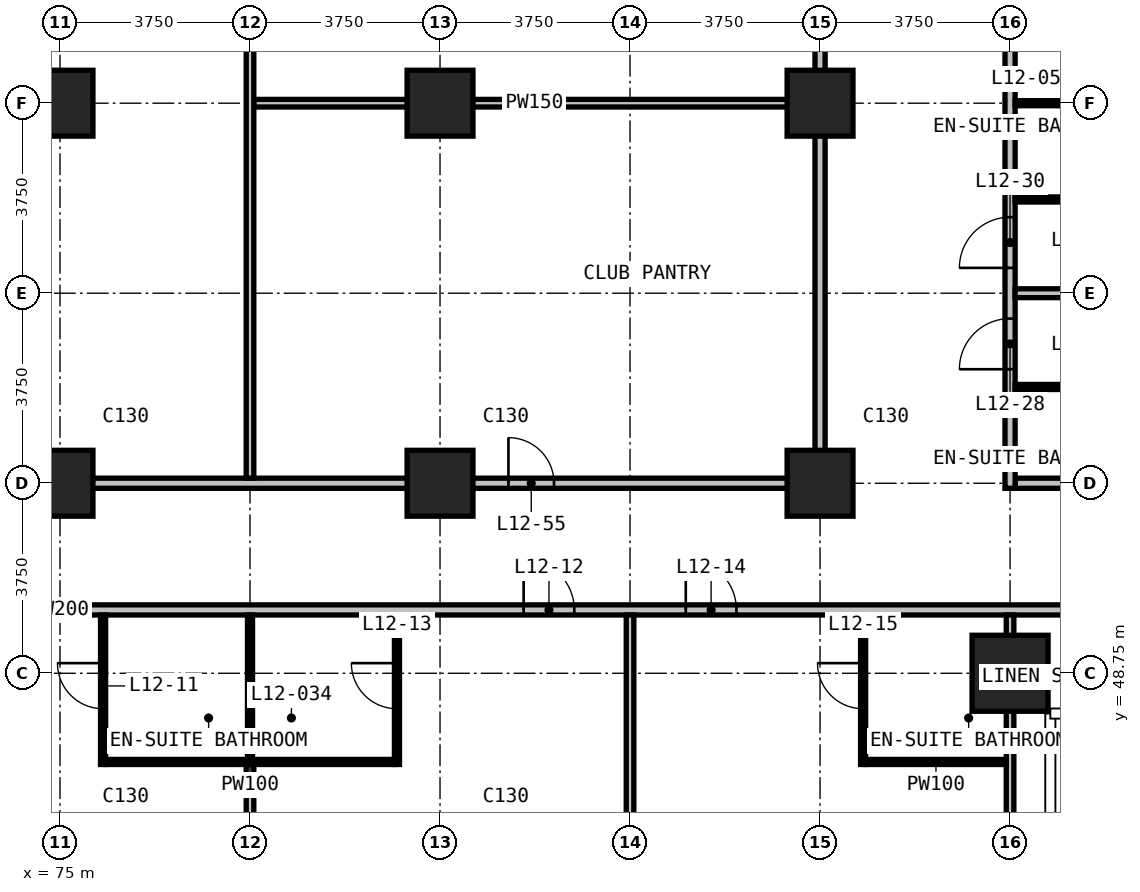
"""IFC4 building model, lengths in metres.
Left out: names, types, materials, properties, quantities, classifications, styles, units other than length and angle.
Written with IfcOpenShell. Run it as: python <this file> out.ifc"""

import sys

from ifc_helpers import new_model, si_unit, direction, frame, frame_2d, origin, origin_2d, place, context, subcontext, project, spatial, rectangle, extrude, element, fill, save


model = new_model("IFC4")
c1 = context("Model", 3, precision=1e-05, world=origin(), true_north=direction((0.0, 1.0)))
c2 = subcontext(c1, "Body", "Model", "MODEL_VIEW")
j1 = project(units=[si_unit("LENGTHUNIT", "METRE"), si_unit("PLANEANGLEUNIT", "RADIAN")], contexts=[c1])
p1 = place(None, origin())
s1 = spatial("IfcSite", under=j1, at=p1, CompositionType="ELEMENT")
p2 = place(p1, origin())
s2 = spatial("IfcBuilding", under=s1, at=p2, CompositionType="ELEMENT")
p3 = place(p2, frame((0.0, 0.0, 59.3)))
s3 = spatial("IfcBuildingStorey", under=s2, at=p3, CompositionType="ELEMENT", Elevation=59.3)
for number, where, z_axis, x_axis in (
    (1, (75.0, 52.5, 0.0), (0.0, 0.0, 1.0), (1.0, 0.0, 0.0)),
    (2, (75.0, 60.0, 0.0), (0.0, 0.0, 1.0), (1.0, 0.0, 0.0)),
    (3, (82.5, 52.5, 0.0), (0.0, 0.0, 1.0), (1.0, 0.0, 0.0)),
    (4, (82.5, 60.0, 0.0), (0.0, 0.0, 1.0), (1.0, 0.0, 0.0)),
    (5, (90.0, 52.5, 0.0), (0.0, 0.0, 1.0), (1.0, 0.0, 0.0)),
    (6, (90.0, 60.0, 0.0), (0.0, 0.0, 1.0), (1.0, 0.0, 0.0)),
):
    element("IfcColumn", number, at=place(p3, frame(where, z_axis=z_axis, x_axis=x_axis)), inside=s3, PredefinedType="COLUMN", context=c2, shape_type="SweptSolid", body=[
        extrude(rectangle(XDim=1.3, YDim=1.3, at=origin_2d()), origin(), (0.0, 0.0, 1.0), 3.3),
    ])
p4 = place(p3, frame((93.75, 48.75, 0.0), z_axis=(0.0, 0.0, 1.0), x_axis=(1.0, 0.0, 0.0)))
e7 = element("IfcColumn", 7, at=p4, inside=s3, PredefinedType="COLUMN", context=c2, shape_type="SweptSolid", body=[
    extrude(rectangle(XDim=1.5, YDim=1.5, at=origin_2d()), origin(), (0.0, 0.0, 1.0), 3.3),
])
p5 = place(p3, frame((51.735, 50.0, 0.0), z_axis=(0.0, 0.0, 1.0), x_axis=(1.0, 0.0, 0.0)))
e8 = element("IfcWall", 8, at=p5, inside=s3, PredefinedType="PARTITIONING", context=c2, shape_type="SweptSolid", body=[
    extrude(rectangle(XDim=46.53, YDim=0.2, at=frame_2d((23.265, 0.0))), origin(), (0.0, 0.0, 1.0), 3.0),
])
p6 = place(p5, frame((5.615, 0.0, 0.0)))
e9 = element("IfcOpeningElement", 9, at=p6, cuts=e8, PredefinedType="OPENING", context=c2, shape_type="SweptSolid", body=[
    extrude(rectangle(XDim=1.0, YDim=2.2, at=frame_2d((0.5, 1.1))), frame((0.0, 0.11, 0.0), z_axis=(0.0, -1.0, 0.0), x_axis=(1.0, 0.0, 0.0)), (0.0, 0.0, 1.0), 0.22),
])
p7 = place(p5, frame((17.415, 0.0, 0.0)))
e10 = element("IfcOpeningElement", 10, at=p7, cuts=e8, PredefinedType="OPENING", context=c2, shape_type="SweptSolid", body=[
    extrude(rectangle(XDim=1.0, YDim=2.2, at=frame_2d((0.5, 1.1))), frame((0.0, 0.11, 0.0), z_axis=(0.0, -1.0, 0.0), x_axis=(1.0, 0.0, 0.0)), (0.0, 0.0, 1.0), 0.22),
])
p8 = place(p5, frame((20.615, 0.0, 0.0)))
e11 = element("IfcOpeningElement", 11, at=p8, cuts=e8, PredefinedType="OPENING", context=c2, shape_type="SweptSolid", body=[
    extrude(rectangle(XDim=1.0, YDim=2.2, at=frame_2d((0.5, 1.1))), frame((0.0, 0.11, 0.0), z_axis=(0.0, -1.0, 0.0), x_axis=(1.0, 0.0, 0.0)), (0.0, 0.0, 1.0), 0.22),
])
p9 = place(p5, frame((32.415, 0.0, 0.0)))
e12 = element("IfcOpeningElement", 12, at=p9, cuts=e8, PredefinedType="OPENING", context=c2, shape_type="SweptSolid", body=[
    extrude(rectangle(XDim=1.0, YDim=2.2, at=frame_2d((0.5, 1.1))), frame((0.0, 0.11, 0.0), z_axis=(0.0, -1.0, 0.0), x_axis=(1.0, 0.0, 0.0)), (0.0, 0.0, 1.0), 0.22),
])
p10 = place(p5, frame((35.615, 0.0, 0.0)))
e13 = element("IfcOpeningElement", 13, at=p10, cuts=e8, PredefinedType="OPENING", context=c2, shape_type="SweptSolid", body=[
    extrude(rectangle(XDim=1.0, YDim=2.2, at=frame_2d((0.5, 1.1))), frame((0.0, 0.11, 0.0), z_axis=(0.0, -1.0, 0.0), x_axis=(1.0, 0.0, 0.0)), (0.0, 0.0, 1.0), 0.22),
])
p11 = place(p5, frame((1.8, 0.0, 0.0)))
e14 = element("IfcOpeningElement", 14, at=p11, cuts=e8, PredefinedType="OPENING", context=c2, shape_type="SweptSolid", body=[
    extrude(rectangle(XDim=0.9, YDim=2.2, at=frame_2d((0.45, 1.1))), frame((0.0, 0.11, 0.0), z_axis=(0.0, -1.0, 0.0), x_axis=(1.0, 0.0, 0.0)), (0.0, 0.0, 1.0), 0.22),
])
p12 = place(p5, frame((43.815, 0.0, 0.0)))
e15 = element("IfcOpeningElement", 15, at=p12, cuts=e8, PredefinedType="OPENING", context=c2, shape_type="SweptSolid", body=[
    extrude(rectangle(XDim=0.9, YDim=2.2, at=frame_2d((0.45, 1.1))), frame((0.0, 0.11, 0.0), z_axis=(0.0, -1.0, 0.0), x_axis=(1.0, 0.0, 0.0)), (0.0, 0.0, 1.0), 0.22),
])
p13 = place(p3, frame((60.1, 52.5, 0.0), z_axis=(0.0, 0.0, 1.0), x_axis=(1.0, 0.0, 0.0)))
e16 = element("IfcWall", 16, at=p13, inside=s3, PredefinedType="PARTITIONING", context=c2, shape_type="SweptSolid", body=[
    extrude(rectangle(XDim=29.8, YDim=0.2, at=frame_2d((14.9, 0.0))), origin(), (0.0, 0.0, 1.0), 3.0),
])
p14 = place(p13, frame((8.4, 0.0, 0.0)))
e17 = element("IfcOpeningElement", 17, at=p14, cuts=e16, PredefinedType="OPENING", context=c2, shape_type="SweptSolid", body=[
    extrude(rectangle(XDim=1.8, YDim=2.2, at=frame_2d((0.9, 1.1))), frame((0.0, 0.11, 0.0), z_axis=(0.0, -1.0, 0.0), x_axis=(1.0, 0.0, 0.0)), (0.0, 0.0, 1.0), 0.22),
])
p15 = place(p13, frame((23.75, 0.0, 0.0)))
e18 = element("IfcOpeningElement", 18, at=p15, cuts=e16, PredefinedType="OPENING", context=c2, shape_type="SweptSolid", body=[
    extrude(rectangle(XDim=0.9, YDim=2.2, at=frame_2d((0.45, 1.1))), frame((0.0, 0.11, 0.0), z_axis=(0.0, -1.0, 0.0), x_axis=(1.0, 0.0, 0.0)), (0.0, 0.0, 1.0), 0.22),
])
p16 = place(p3, frame((93.85, 52.5, 0.0), z_axis=(0.0, 0.0, 1.0), x_axis=(1.0, 0.0, 0.0)))
e19 = element("IfcWall", 19, at=p16, inside=s3, PredefinedType="PARTITIONING", context=c2, shape_type="SweptSolid", body=[
    extrude(rectangle(XDim=4.315, YDim=0.2, at=frame_2d((2.157, 0.0))), origin(), (0.0, 0.0, 1.0), 3.0),
])
p17 = place(p3, frame((90.0, 52.4, 0.0), z_axis=(0.0, 0.0, 1.0), x_axis=(0.0, 1.0, 0.0)))
e20 = element("IfcWall", 20, at=p17, inside=s3, PredefinedType="PARTITIONING", context=c2, shape_type="SweptSolid", body=[
    extrude(rectangle(XDim=18.84, YDim=0.2, at=frame_2d((9.42, 0.0))), origin(), (0.0, 0.0, 1.0), 3.0),
])
p18 = place(p17, frame((10.85, 0.0, 0.0)))
e21 = element("IfcOpeningElement", 21, at=p18, cuts=e20, PredefinedType="OPENING", context=c2, shape_type="SweptSolid", body=[
    extrude(rectangle(XDim=1.0, YDim=2.2, at=frame_2d((0.5, 1.1))), frame((0.0, 0.11, 0.0), z_axis=(0.0, -1.0, 0.0), x_axis=(1.0, 0.0, 0.0)), (0.0, 0.0, 1.0), 0.22),
])
p19 = place(p17, frame((16.5, 0.0, 0.0)))
e22 = element("IfcOpeningElement", 22, at=p19, cuts=e20, PredefinedType="OPENING", context=c2, shape_type="SweptSolid", body=[
    extrude(rectangle(XDim=0.9, YDim=2.2, at=frame_2d((0.45, 1.1))), frame((0.0, 0.11, 0.0), z_axis=(0.0, -1.0, 0.0), x_axis=(1.0, 0.0, 0.0)), (0.0, 0.0, 1.0), 0.22),
])
p20 = place(p3, frame((93.75, 52.4, 0.0), z_axis=(0.0, 0.0, 1.0), x_axis=(0.0, 1.0, 0.0)))
e23 = element("IfcWall", 23, at=p20, inside=s3, PredefinedType="PARTITIONING", context=c2, shape_type="SweptSolid", body=[
    extrude(rectangle(XDim=33.925, YDim=0.2, at=frame_2d((16.962, 0.0))), origin(), (0.0, 0.0, 1.0), 3.0),
])
p21 = place(p20, frame((2.35, 0.0, 0.0)))
e24 = element("IfcOpeningElement", 24, at=p21, cuts=e23, PredefinedType="OPENING", context=c2, shape_type="SweptSolid", body=[
    extrude(rectangle(XDim=1.0, YDim=2.2, at=frame_2d((0.5, 1.1))), frame((0.0, 0.11, 0.0), z_axis=(0.0, -1.0, 0.0), x_axis=(1.0, 0.0, 0.0)), (0.0, 0.0, 1.0), 0.22),
])
p22 = place(p20, frame((4.35, 0.0, 0.0)))
e25 = element("IfcOpeningElement", 25, at=p22, cuts=e23, PredefinedType="OPENING", context=c2, shape_type="SweptSolid", body=[
    extrude(rectangle(XDim=1.0, YDim=2.2, at=frame_2d((0.5, 1.1))), frame((0.0, 0.11, 0.0), z_axis=(0.0, -1.0, 0.0), x_axis=(1.0, 0.0, 0.0)), (0.0, 0.0, 1.0), 0.22),
])
p23 = place(p20, frame((9.85, 0.0, 0.0)))
e26 = element("IfcOpeningElement", 26, at=p23, cuts=e23, PredefinedType="OPENING", context=c2, shape_type="SweptSolid", body=[
    extrude(rectangle(XDim=1.0, YDim=2.2, at=frame_2d((0.5, 1.1))), frame((0.0, 0.11, 0.0), z_axis=(0.0, -1.0, 0.0), x_axis=(1.0, 0.0, 0.0)), (0.0, 0.0, 1.0), 0.22),
])
p24 = place(p20, frame((11.85, 0.0, 0.0)))
e27 = element("IfcOpeningElement", 27, at=p24, cuts=e23, PredefinedType="OPENING", context=c2, shape_type="SweptSolid", body=[
    extrude(rectangle(XDim=1.0, YDim=2.2, at=frame_2d((0.5, 1.1))), frame((0.0, 0.11, 0.0), z_axis=(0.0, -1.0, 0.0), x_axis=(1.0, 0.0, 0.0)), (0.0, 0.0, 1.0), 0.22),
])
p25 = place(p20, frame((17.35, 0.0, 0.0)))
e28 = element("IfcOpeningElement", 28, at=p25, cuts=e23, PredefinedType="OPENING", context=c2, shape_type="SweptSolid", body=[
    extrude(rectangle(XDim=1.0, YDim=2.2, at=frame_2d((0.5, 1.1))), frame((0.0, 0.11, 0.0), z_axis=(0.0, -1.0, 0.0), x_axis=(1.0, 0.0, 0.0)), (0.0, 0.0, 1.0), 0.22),
])
p26 = place(p20, frame((19.35, 0.0, 0.0)))
e29 = element("IfcOpeningElement", 29, at=p26, cuts=e23, PredefinedType="OPENING", context=c2, shape_type="SweptSolid", body=[
    extrude(rectangle(XDim=1.0, YDim=2.2, at=frame_2d((0.5, 1.1))), frame((0.0, 0.11, 0.0), z_axis=(0.0, -1.0, 0.0), x_axis=(1.0, 0.0, 0.0)), (0.0, 0.0, 1.0), 0.22),
])
p27 = place(p20, frame((24.85, 0.0, 0.0)))
e30 = element("IfcOpeningElement", 30, at=p27, cuts=e23, PredefinedType="OPENING", context=c2, shape_type="SweptSolid", body=[
    extrude(rectangle(XDim=1.0, YDim=2.2, at=frame_2d((0.5, 1.1))), frame((0.0, 0.11, 0.0), z_axis=(0.0, -1.0, 0.0), x_axis=(1.0, 0.0, 0.0)), (0.0, 0.0, 1.0), 0.22),
])
p28 = place(p20, frame((26.85, 0.0, 0.0)))
e31 = element("IfcOpeningElement", 31, at=p28, cuts=e23, PredefinedType="OPENING", context=c2, shape_type="SweptSolid", body=[
    extrude(rectangle(XDim=1.0, YDim=2.2, at=frame_2d((0.5, 1.1))), frame((0.0, 0.11, 0.0), z_axis=(0.0, -1.0, 0.0), x_axis=(1.0, 0.0, 0.0)), (0.0, 0.0, 1.0), 0.22),
])
p29 = place(p20, frame((31.55, 0.0, 0.0)))
e32 = element("IfcOpeningElement", 32, at=p29, cuts=e23, PredefinedType="OPENING", context=c2, shape_type="SweptSolid", body=[
    extrude(rectangle(XDim=0.9, YDim=2.2, at=frame_2d((0.45, 1.1))), frame((0.0, 0.11, 0.0), z_axis=(0.0, -1.0, 0.0), x_axis=(1.0, 0.0, 0.0)), (0.0, 0.0, 1.0), 0.22),
])
p30 = place(p3, frame((93.85, 56.25, 0.0), z_axis=(0.0, 0.0, 1.0), x_axis=(1.0, 0.0, 0.0)))
e33 = element("IfcWall", 33, at=p30, inside=s3, PredefinedType="PARTITIONING", context=c2, shape_type="SweptSolid", body=[
    extrude(rectangle(XDim=8.165, YDim=0.175, at=frame_2d((4.083, 0.0))), origin(), (0.0, 0.0, 1.0), 3.0),
])
p31 = place(p3, frame((78.825, 60.0, 0.0), z_axis=(0.0, 0.0, 1.0), x_axis=(1.0, 0.0, 0.0)))
e34 = element("IfcWall", 34, at=p31, inside=s3, PredefinedType="PARTITIONING", context=c2, shape_type="SweptSolid", body=[
    extrude(rectangle(XDim=11.075, YDim=0.15, at=frame_2d((5.538, 0.0))), origin(), (0.0, 0.0, 1.0), 3.0),
])
p32 = place(p3, frame((78.75, 40.54, 0.0), z_axis=(0.0, 0.0, 1.0), x_axis=(0.0, 1.0, 0.0)))
e35 = element("IfcWall", 35, at=p32, inside=s3, PredefinedType="PARTITIONING", context=c2, shape_type="SweptSolid", body=[
    extrude(rectangle(XDim=6.41, YDim=0.15, at=frame_2d((3.205, 0.0))), origin(), (0.0, 0.0, 1.0), 3.0),
])
p33 = place(p3, frame((78.75, 52.6, 0.0), z_axis=(0.0, 0.0, 1.0), x_axis=(0.0, 1.0, 0.0)))
e36 = element("IfcWall", 36, at=p33, inside=s3, PredefinedType="PARTITIONING", context=c2, shape_type="SweptSolid", body=[
    extrude(rectangle(XDim=18.64, YDim=0.15, at=frame_2d((9.32, 0.0))), origin(), (0.0, 0.0, 1.0), 3.0),
])
p34 = place(p3, frame((86.25, 40.54, 0.0), z_axis=(0.0, 0.0, 1.0), x_axis=(0.0, 1.0, 0.0)))
e37 = element("IfcWall", 37, at=p34, inside=s3, PredefinedType="PARTITIONING", context=c2, shape_type="SweptSolid", body=[
    extrude(rectangle(XDim=9.36, YDim=0.15, at=frame_2d((4.68, 0.0))), origin(), (0.0, 0.0, 1.0), 3.0),
])
p35 = place(p3, frame((93.75, 44.235, 0.0), z_axis=(0.0, 0.0, 1.0), x_axis=(0.0, 1.0, 0.0)))
e38 = element("IfcWall", 38, at=p35, inside=s3, PredefinedType="PARTITIONING", context=c2, shape_type="SweptSolid", body=[
    extrude(rectangle(XDim=5.665, YDim=0.15, at=frame_2d((2.833, 0.0))), origin(), (0.0, 0.0, 1.0), 3.0),
])
p36 = place(p3, frame((75.9, 47.0, 0.0), z_axis=(0.0, 0.0, 1.0), x_axis=(1.0, 0.0, 0.0)))
e39 = element("IfcWall", 39, at=p36, inside=s3, PredefinedType="PARTITIONING", context=c2, shape_type="SweptSolid", body=[
    extrude(rectangle(XDim=5.7, YDim=0.1, at=frame_2d((2.85, 0.0))), origin(), (0.0, 0.0, 1.0), 3.0),
])
p37 = place(p3, frame((90.9, 47.0, 0.0), z_axis=(0.0, 0.0, 1.0), x_axis=(1.0, 0.0, 0.0)))
e40 = element("IfcWall", 40, at=p37, inside=s3, PredefinedType="PARTITIONING", context=c2, shape_type="SweptSolid", body=[
    extrude(rectangle(XDim=2.775, YDim=0.1, at=frame_2d((1.388, 0.0))), origin(), (0.0, 0.0, 1.0), 3.0),
])
p38 = place(p3, frame((93.85, 54.4, 0.0), z_axis=(0.0, 0.0, 1.0), x_axis=(1.0, 0.0, 0.0)))
e41 = element("IfcWall", 41, at=p38, inside=s3, PredefinedType="PARTITIONING", context=c2, shape_type="SweptSolid", body=[
    extrude(rectangle(XDim=2.75, YDim=0.1, at=frame_2d((1.375, 0.0))), origin(), (0.0, 0.0, 1.0), 3.0),
])
p39 = place(p38, frame((0.95, 0.0, 0.0)))
e42 = element("IfcOpeningElement", 42, at=p39, cuts=e41, PredefinedType="OPENING", context=c2, shape_type="SweptSolid", body=[
    extrude(rectangle(XDim=0.9, YDim=2.2, at=frame_2d((0.45, 1.1))), frame((0.0, 0.06, 0.0), z_axis=(0.0, -1.0, 0.0), x_axis=(1.0, 0.0, 0.0)), (0.0, 0.0, 1.0), 0.12),
])
p40 = place(p3, frame((93.85, 58.1, 0.0), z_axis=(0.0, 0.0, 1.0), x_axis=(1.0, 0.0, 0.0)))
e43 = element("IfcWall", 43, at=p40, inside=s3, PredefinedType="PARTITIONING", context=c2, shape_type="SweptSolid", body=[
    extrude(rectangle(XDim=2.75, YDim=0.1, at=frame_2d((1.375, 0.0))), origin(), (0.0, 0.0, 1.0), 3.0),
])
p41 = place(p40, frame((0.95, 0.0, 0.0)))
e44 = element("IfcOpeningElement", 44, at=p41, cuts=e43, PredefinedType="OPENING", context=c2, shape_type="SweptSolid", body=[
    extrude(rectangle(XDim=0.9, YDim=2.2, at=frame_2d((0.45, 1.1))), frame((0.0, 0.06, 0.0), z_axis=(0.0, -1.0, 0.0), x_axis=(1.0, 0.0, 0.0)), (0.0, 0.0, 1.0), 0.12),
])
p42 = place(p3, frame((93.85, 60.0, 0.0), z_axis=(0.0, 0.0, 1.0), x_axis=(1.0, 0.0, 0.0)))
e45 = element("IfcWall", 45, at=p42, inside=s3, PredefinedType="PARTITIONING", context=c2, shape_type="SweptSolid", body=[
    extrude(rectangle(XDim=2.75, YDim=0.1, at=frame_2d((1.375, 0.0))), origin(), (0.0, 0.0, 1.0), 3.0),
])
p43 = place(p3, frame((75.85, 46.95, 0.0), z_axis=(0.0, 0.0, 1.0), x_axis=(0.0, 1.0, 0.0)))
e46 = element("IfcWall", 46, at=p43, inside=s3, PredefinedType="PARTITIONING", context=c2, shape_type="SweptSolid", body=[
    extrude(rectangle(XDim=2.95, YDim=0.1, at=frame_2d((1.475, 0.0))), origin(), (0.0, 0.0, 1.0), 3.0),
])
p44 = place(p43, frame((1.1, 0.0, 0.0)))
e47 = element("IfcOpeningElement", 47, at=p44, cuts=e46, PredefinedType="OPENING", context=c2, shape_type="SweptSolid", body=[
    extrude(rectangle(XDim=0.9, YDim=2.2, at=frame_2d((0.45, 1.1))), frame((0.0, 0.06, 0.0), z_axis=(0.0, -1.0, 0.0), x_axis=(1.0, 0.0, 0.0)), (0.0, 0.0, 1.0), 0.12),
])
p45 = place(p3, frame((78.75, 47.05, 0.0), z_axis=(0.0, 0.0, 1.0), x_axis=(0.0, 1.0, 0.0)))
e48 = element("IfcWall", 48, at=p45, inside=s3, PredefinedType="PARTITIONING", context=c2, shape_type="SweptSolid", body=[
    extrude(rectangle(XDim=2.85, YDim=0.1, at=frame_2d((1.425, 0.0))), origin(), (0.0, 0.0, 1.0), 3.0),
])
p46 = place(p3, frame((81.65, 46.95, 0.0), z_axis=(0.0, 0.0, 1.0), x_axis=(0.0, 1.0, 0.0)))
e49 = element("IfcWall", 49, at=p46, inside=s3, PredefinedType="PARTITIONING", context=c2, shape_type="SweptSolid", body=[
    extrude(rectangle(XDim=2.95, YDim=0.1, at=frame_2d((1.475, 0.0))), origin(), (0.0, 0.0, 1.0), 3.0),
])
p47 = place(p46, frame((1.1, 0.0, 0.0)))
e50 = element("IfcOpeningElement", 50, at=p47, cuts=e49, PredefinedType="OPENING", context=c2, shape_type="SweptSolid", body=[
    extrude(rectangle(XDim=0.9, YDim=2.2, at=frame_2d((0.45, 1.1))), frame((0.0, 0.06, 0.0), z_axis=(0.0, -1.0, 0.0), x_axis=(1.0, 0.0, 0.0)), (0.0, 0.0, 1.0), 0.12),
])
p48 = place(p3, frame((90.85, 46.95, 0.0), z_axis=(0.0, 0.0, 1.0), x_axis=(0.0, 1.0, 0.0)))
e51 = element("IfcWall", 51, at=p48, inside=s3, PredefinedType="PARTITIONING", context=c2, shape_type="SweptSolid", body=[
    extrude(rectangle(XDim=2.95, YDim=0.1, at=frame_2d((1.475, 0.0))), origin(), (0.0, 0.0, 1.0), 3.0),
])
p49 = place(p48, frame((1.1, 0.0, 0.0)))
e52 = element("IfcOpeningElement", 52, at=p49, cuts=e51, PredefinedType="OPENING", context=c2, shape_type="SweptSolid", body=[
    extrude(rectangle(XDim=0.9, YDim=2.2, at=frame_2d((0.45, 1.1))), frame((0.0, 0.06, 0.0), z_axis=(0.0, -1.0, 0.0), x_axis=(1.0, 0.0, 0.0)), (0.0, 0.0, 1.0), 0.12),
])
p50 = place(p44, origin())
e53 = element("IfcDoor", 53, at=p50, inside=s3, OperationType="SINGLE_SWING_RIGHT", PredefinedType="DOOR", context=c2, shape_type="SweptSolid", body=[
    extrude(rectangle(XDim=0.9, YDim=2.2, at=frame_2d((0.45, 1.1))), frame((0.0, 0.025, 0.0), z_axis=(0.0, -1.0, 0.0), x_axis=(1.0, 0.0, 0.0)), (0.0, 0.0, 1.0), 0.05),
])
fill(e47, e53)
p51 = place(p9, origin())
e54 = element("IfcDoor", 54, at=p51, inside=s3, OperationType="SINGLE_SWING_LEFT", PredefinedType="DOOR", context=c2, shape_type="SweptSolid", body=[
    extrude(rectangle(XDim=1.0, YDim=2.2, at=frame_2d((0.5, 1.1))), frame((0.0, 0.025, 0.0), z_axis=(0.0, -1.0, 0.0), x_axis=(1.0, 0.0, 0.0)), (0.0, 0.0, 1.0), 0.05),
])
fill(e12, e54)
p52 = place(p47, origin())
e55 = element("IfcDoor", 55, at=p52, inside=s3, OperationType="SINGLE_SWING_RIGHT", PredefinedType="DOOR", context=c2, shape_type="SweptSolid", body=[
    extrude(rectangle(XDim=0.9, YDim=2.2, at=frame_2d((0.45, 1.1))), frame((0.0, 0.025, 0.0), z_axis=(0.0, -1.0, 0.0), x_axis=(1.0, 0.0, 0.0)), (0.0, 0.0, 1.0), 0.05),
])
fill(e50, e55)
p53 = place(p10, origin())
e56 = element("IfcDoor", 56, at=p53, inside=s3, OperationType="SINGLE_SWING_RIGHT", PredefinedType="DOOR", context=c2, shape_type="SweptSolid", body=[
    extrude(rectangle(XDim=1.0, YDim=2.2, at=frame_2d((0.5, 1.1))), frame((0.0, 0.025, 0.0), z_axis=(0.0, -1.0, 0.0), x_axis=(1.0, 0.0, 0.0)), (0.0, 0.0, 1.0), 0.05),
])
fill(e13, e56)
p54 = place(p49, origin())
e57 = element("IfcDoor", 57, at=p54, inside=s3, OperationType="SINGLE_SWING_RIGHT", PredefinedType="DOOR", context=c2, shape_type="SweptSolid", body=[
    extrude(rectangle(XDim=0.9, YDim=2.2, at=frame_2d((0.45, 1.1))), frame((0.0, 0.025, 0.0), z_axis=(0.0, -1.0, 0.0), x_axis=(1.0, 0.0, 0.0)), (0.0, 0.0, 1.0), 0.05),
])
fill(e52, e57)
p55 = place(p21, origin())
e58 = element("IfcDoor", 58, at=p55, inside=s3, OperationType="SINGLE_SWING_RIGHT", PredefinedType="DOOR", context=c2, shape_type="SweptSolid", body=[
    extrude(rectangle(XDim=1.0, YDim=2.2, at=frame_2d((0.5, 1.1))), frame((0.0, 0.025, 0.0), z_axis=(0.0, -1.0, 0.0), x_axis=(1.0, 0.0, 0.0)), (0.0, 0.0, 1.0), 0.05),
])
fill(e24, e58)
p56 = place(p22, origin())
e59 = element("IfcDoor", 59, at=p56, inside=s3, OperationType="SINGLE_SWING_RIGHT", PredefinedType="DOOR", context=c2, shape_type="SweptSolid", body=[
    extrude(rectangle(XDim=1.0, YDim=2.2, at=frame_2d((0.5, 1.1))), frame((0.0, 0.025, 0.0), z_axis=(0.0, -1.0, 0.0), x_axis=(1.0, 0.0, 0.0)), (0.0, 0.0, 1.0), 0.05),
])
fill(e25, e59)
p57 = place(p15, origin())
e60 = element("IfcDoor", 60, at=p57, inside=s3, OperationType="SINGLE_SWING_RIGHT", PredefinedType="DOOR", context=c2, shape_type="SweptSolid", body=[
    extrude(rectangle(XDim=0.9, YDim=2.2, at=frame_2d((0.45, 1.1))), frame((0.0, 0.025, 0.0), z_axis=(0.0, -1.0, 0.0), x_axis=(1.0, 0.0, 0.0)), (0.0, 0.0, 1.0), 0.05),
])
fill(e18, e60)
save(model, sys.argv[1])
